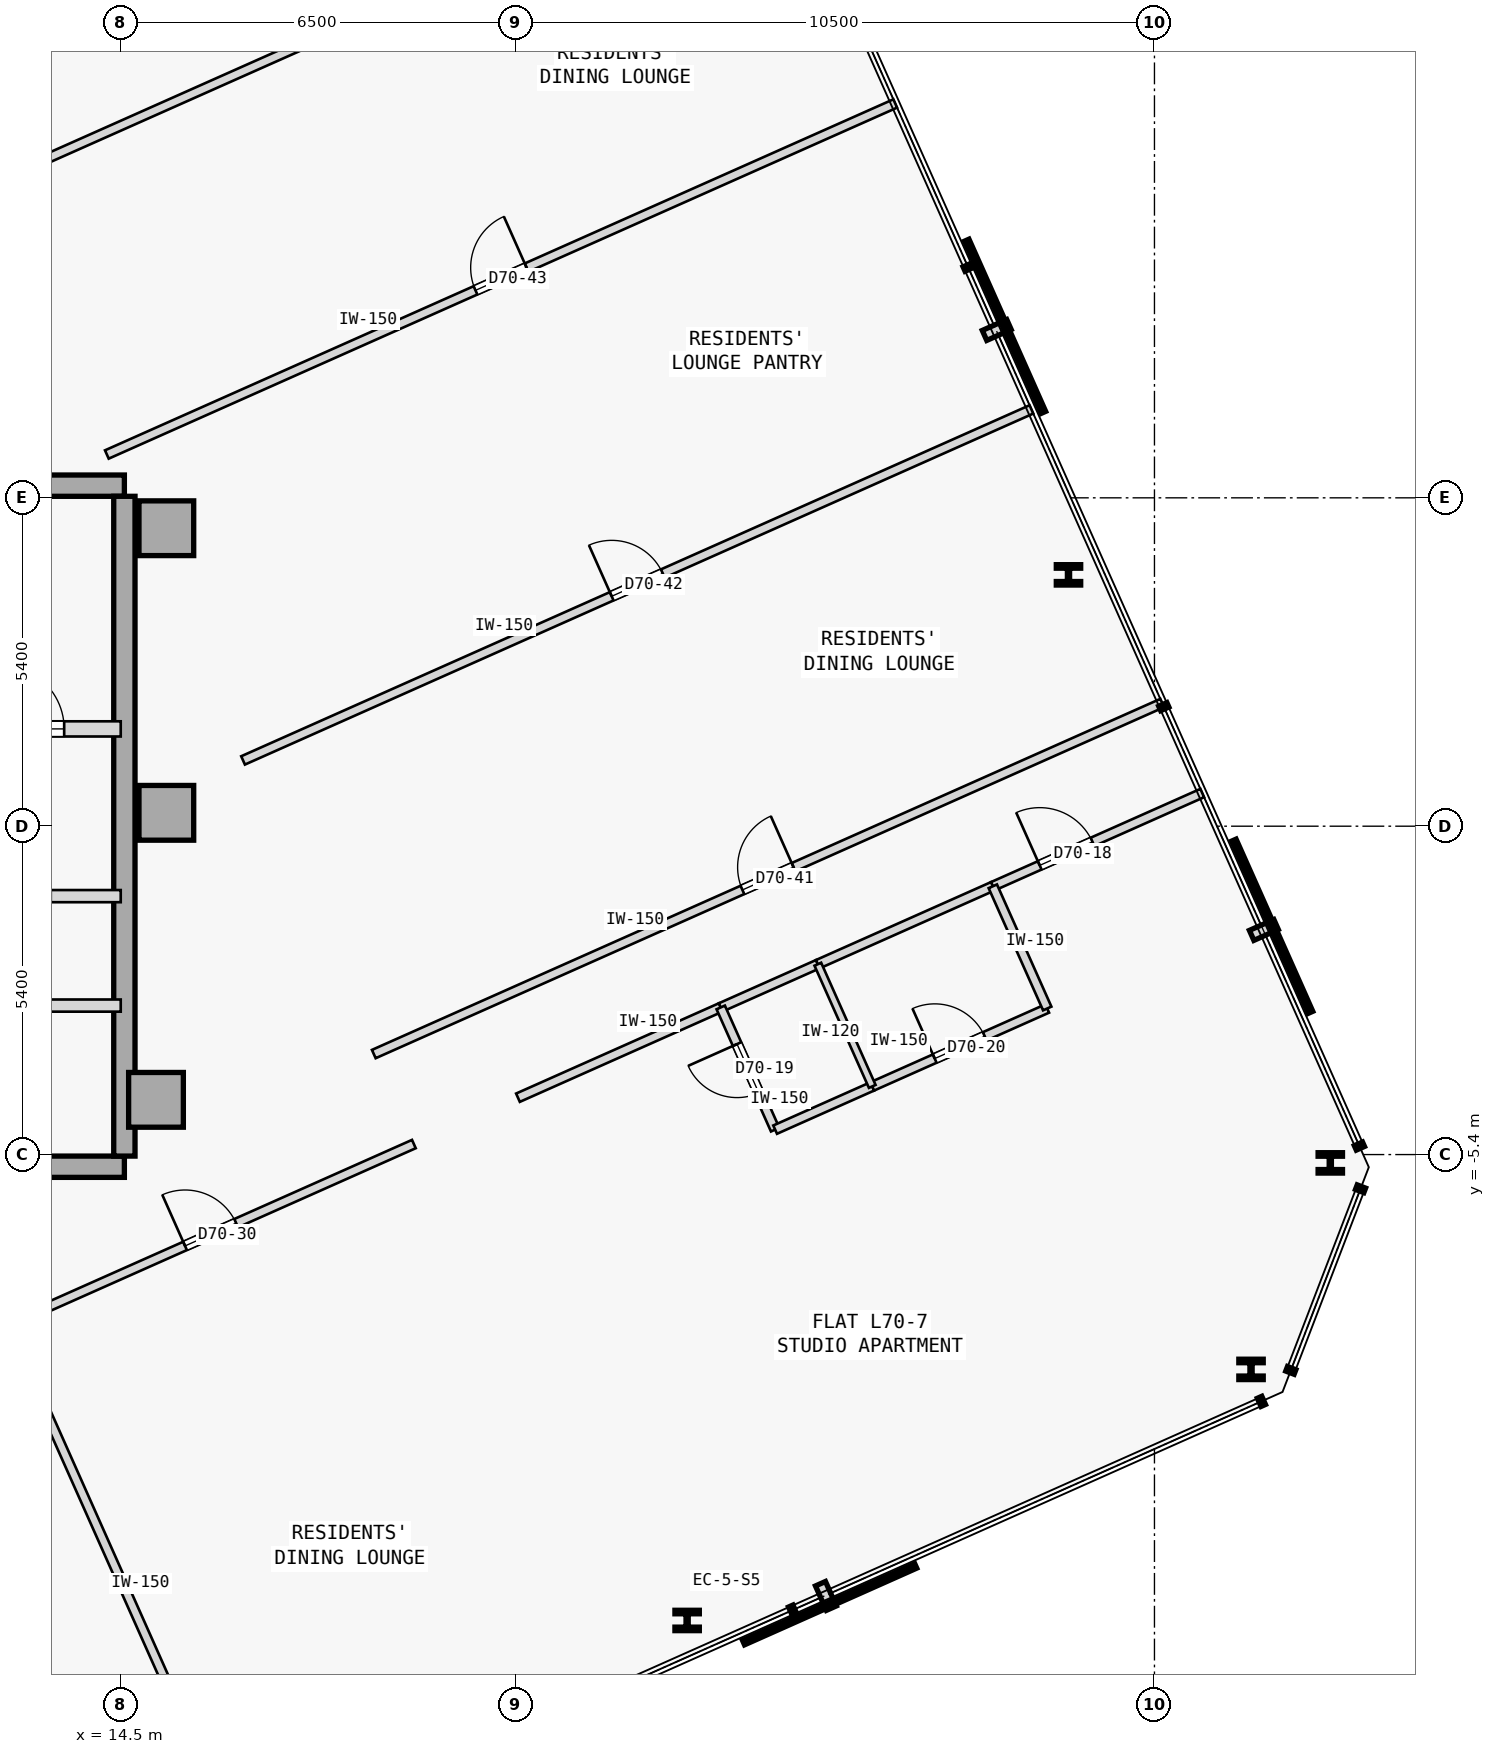
"""IFC4 building model, lengths in metres.
Left out: names, types, materials, properties, quantities, classifications, styles, units other than length and angle.
Written with IfcOpenShell. Run it as: python <this file> out.ifc"""

import sys

from ifc_helpers import new_model, si_unit, direction, frame, frame_2d, origin, origin_2d, place, context, subcontext, project, spatial, rectangle, i_section, extrude, element, fill, save


model = new_model("IFC4")
c1 = context("Model", 3, precision=1e-05, world=origin(), true_north=direction((0.0, 1.0)))
c2 = subcontext(c1, "Body", "Model", "MODEL_VIEW")
j1 = project(units=[si_unit("LENGTHUNIT", "METRE"), si_unit("PLANEANGLEUNIT", "RADIAN")], contexts=[c1])
p1 = place(None, origin())
s1 = spatial("IfcSite", under=j1, at=p1, CompositionType="ELEMENT")
p2 = place(p1, origin())
s2 = spatial("IfcBuilding", under=s1, at=p2, CompositionType="ELEMENT")
p3 = place(p2, frame((0.0, 0.0, 262.2)))
s3 = spatial("IfcBuildingStorey", under=s2, at=p3, CompositionType="ELEMENT", Elevation=262.2)
for number, where, z_axis, x_axis in (
    (1, (15.25, 4.9, 0.0), (0.0, 0.0, 1.0), (1.0, 0.0, 0.0)),
    (2, (15.25, 0.22, 0.0), (0.0, 0.0, 1.0), (1.0, 0.0, 0.0)),
    (3, (15.08, -4.5, 0.0), (0.0, 0.0, 1.0), (1.0, 0.0, 0.0)),
):
    element("IfcColumn", number, at=place(p3, frame(where, z_axis=z_axis, x_axis=x_axis)), inside=s3, PredefinedType="COLUMN", context=c2, shape_type="SweptSolid", body=[
        extrude(rectangle(XDim=0.9, YDim=0.9, at=origin_2d()), origin(), (0.0, 0.0, 1.0), 3.35),
    ])
p4 = place(p3, frame((3.15, 5.6, 0.0), z_axis=(0.0, 0.0, 1.0), x_axis=(1.0, 0.0, 0.0)))
e4 = element("IfcWall", 4, at=p4, inside=s3, PredefinedType="SHEAR", context=c2, shape_type="SweptSolid", body=[
    extrude(rectangle(XDim=11.41, YDim=0.35, at=frame_2d((5.705, 0.0))), origin(), (0.0, 0.0, 1.0), 3.125),
])
p5 = place(p3, frame((3.7, -5.6, 0.0), z_axis=(0.0, 0.0, 1.0), x_axis=(1.0, 0.0, 0.0)))
e5 = element("IfcWall", 5, at=p5, inside=s3, PredefinedType="SHEAR", context=c2, shape_type="SweptSolid", body=[
    extrude(rectangle(XDim=10.86, YDim=0.35, at=frame_2d((5.43, 0.0))), origin(), (0.0, 0.0, 1.0), 3.125),
])
p6 = place(p3, frame((14.56, -5.425, 0.0), z_axis=(0.0, 0.0, 1.0), x_axis=(0.0, 1.0, 0.0)))
e6 = element("IfcWall", 6, at=p6, inside=s3, PredefinedType="SHEAR", context=c2, shape_type="SweptSolid", body=[
    extrude(rectangle(XDim=10.85, YDim=0.35, at=frame_2d((5.425, 0.0))), origin(), (0.0, 0.0, 1.0), 3.125),
])
for number, where, z_axis, x_axis in (
    (7, (23.814, -13.062, 0.0), (0.0, 0.0, 1.0), (1.0, 0.0, 0.0)),
    (8, (33.088, -8.933, 0.0), (0.0, 0.0, 1.0), (1.0, 0.0, 0.0)),
    (9, (34.392, -5.537, 0.0), (0.0, 0.0, 1.0), (1.0, 0.0, 0.0)),
    (10, (30.086, 4.133, 0.0), (0.0, 0.0, 1.0), (1.0, 0.0, 0.0)),
):
    element("IfcColumn", number, at=place(p3, frame(where, z_axis=z_axis, x_axis=x_axis)), inside=s3, PredefinedType="COLUMN", context=c2, shape_type="SweptSolid", body=[
        extrude(i_section(OverallWidth=0.401, OverallDepth=0.335, WebThickness=0.036, FlangeThickness=0.058, FilletRadius=0.015, at=origin_2d()), origin(), (0.0, 0.0, 1.0), 3.35),
    ])
p7 = place(p3, frame((10.9, 1.6, 0.0), z_axis=(0.0, 0.0, 1.0), x_axis=(1.0, 0.0, 0.0)))
e11 = element("IfcWall", 11, at=p7, inside=s3, PredefinedType="STANDARD", context=c2, shape_type="SweptSolid", body=[
    extrude(rectangle(XDim=3.6, YDim=0.25, at=frame_2d((1.8, 0.0))), origin(), (0.0, 0.0, 1.0), 3.125),
])
p8 = place(p7, frame((1.62, 0.0, 0.0)))
e12 = element("IfcOpeningElement", 12, at=p8, cuts=e11, PredefinedType="OPENING", context=c2, shape_type="SweptSolid", body=[
    extrude(rectangle(XDim=1.05, YDim=2.15, at=frame_2d((0.525, 1.075))), frame((0.0, 0.135, 0.0), z_axis=(0.0, -1.0, 0.0), x_axis=(1.0, 0.0, 0.0)), (0.0, 0.0, 1.0), 0.27),
])
p9 = place(p3, frame((11.55, -1.15, 0.0), z_axis=(0.0, 0.0, 1.0), x_axis=(1.0, 0.0, 0.0)))
e13 = element("IfcWall", 13, at=p9, inside=s3, PredefinedType="STANDARD", context=c2, shape_type="SweptSolid", body=[
    extrude(rectangle(XDim=2.95, YDim=0.2, at=frame_2d((1.475, 0.0))), origin(), (0.0, 0.0, 1.0), 3.125),
])
p10 = place(p9, frame((0.75, 0.0, 0.0)))
e14 = element("IfcOpeningElement", 14, at=p10, cuts=e13, PredefinedType="OPENING", context=c2, shape_type="SweptSolid", body=[
    extrude(rectangle(XDim=1.05, YDim=2.18, at=frame_2d((0.525, 1.09))), frame((0.0, 0.11, 0.0), z_axis=(0.0, -1.0, 0.0), x_axis=(1.0, 0.0, 0.0)), (0.0, 0.0, 1.0), 0.22),
])
p11 = place(p3, frame((3.7, -2.95, 0.0), z_axis=(0.0, 0.0, 1.0), x_axis=(1.0, 0.0, 0.0)))
e15 = element("IfcWall", 15, at=p11, inside=s3, PredefinedType="STANDARD", context=c2, shape_type="SweptSolid", body=[
    extrude(rectangle(XDim=10.8, YDim=0.2, at=frame_2d((5.4, 0.0))), origin(), (0.0, 0.0, 1.0), 3.125),
])
p12 = place(p11, frame((0.53, 0.0, 0.0)))
e16 = element("IfcOpeningElement", 16, at=p12, cuts=e15, PredefinedType="OPENING", context=c2, shape_type="SweptSolid", body=[
    extrude(rectangle(XDim=1.1, YDim=2.15, at=frame_2d((0.55, 1.075))), frame((0.0, 0.11, 0.0), z_axis=(0.0, -1.0, 0.0), x_axis=(1.0, 0.0, 0.0)), (0.0, 0.0, 1.0), 0.22),
])
p13 = place(p11, frame((3.79, 0.0, 0.0)))
e17 = element("IfcOpeningElement", 17, at=p13, cuts=e15, PredefinedType="OPENING", context=c2, shape_type="SweptSolid", body=[
    extrude(rectangle(XDim=0.92, YDim=2.15, at=frame_2d((0.46, 1.075))), frame((0.0, 0.11, 0.0), z_axis=(0.0, -1.0, 0.0), x_axis=(1.0, 0.0, 0.0)), (0.0, 0.0, 1.0), 0.22),
])
p14 = place(p11, frame((8.11, 0.0, 0.0)))
e18 = element("IfcOpeningElement", 18, at=p14, cuts=e15, PredefinedType="OPENING", context=c2, shape_type="SweptSolid", body=[
    extrude(rectangle(XDim=0.92, YDim=2.15, at=frame_2d((0.46, 1.075))), frame((0.0, 0.11, 0.0), z_axis=(0.0, -1.0, 0.0), x_axis=(1.0, 0.0, 0.0)), (0.0, 0.0, 1.0), 0.22),
])
p15 = place(p3, frame((21.033, -4.465, 0.0), z_axis=(0.0, 0.0, 1.0), x_axis=(0.913543802, 0.40674036169, 0.0)))
e19 = element("IfcWall", 19, at=p15, inside=s3, PredefinedType="PARTITIONING", context=c2, shape_type="SweptSolid", body=[
    extrude(rectangle(XDim=3.65, YDim=0.15, at=frame_2d((1.825, 0.0))), origin(), (0.0, 0.0, 1.0), 3.125),
])
p16 = place(p3, frame((28.842, -0.988, 0.0), z_axis=(0.0, 0.0, 1.0), x_axis=(0.913541633228, 0.406745232743, 0.0)))
e20 = element("IfcWall", 20, at=p16, inside=s3, PredefinedType="PARTITIONING", context=c2, shape_type="SweptSolid", body=[
    extrude(rectangle(XDim=3.77, YDim=0.15, at=frame_2d((1.885, 0.0))), origin(), (0.0, 0.0, 1.0), 3.125),
])
p17 = place(p16, frame((0.844, 0.0, 0.0)))
e21 = element("IfcOpeningElement", 21, at=p17, cuts=e20, PredefinedType="OPENING", context=c2, shape_type="SweptSolid", body=[
    extrude(rectangle(XDim=0.95, YDim=2.15, at=frame_2d((0.475, 1.075))), frame((0.0, 0.085, 0.0), z_axis=(0.0, -1.0, 0.0), x_axis=(1.0, 0.0, 0.0)), (0.0, 0.0, 1.0), 0.17),
])
p18 = place(p3, frame((24.367, -2.98, 0.0), z_axis=(0.0, 0.0, 1.0), x_axis=(0.9135579554, 0.406708571492, 0.0)))
e22 = element("IfcWall", 22, at=p18, inside=s3, PredefinedType="PARTITIONING", context=c2, shape_type="SweptSolid", body=[
    extrude(rectangle(XDim=1.748, YDim=0.15, at=frame_2d((0.874, 0.0))), origin(), (0.0, 0.0, 1.0), 3.125),
])
p19 = place(p3, frame((25.964, -2.269, 0.0), z_axis=(0.0, 0.0, 1.0), x_axis=(0.913542880558, 0.406742431252, 0.0)))
e23 = element("IfcWall", 23, at=p19, inside=s3, PredefinedType="PARTITIONING", context=c2, shape_type="SweptSolid", body=[
    extrude(rectangle(XDim=3.15, YDim=0.15, at=frame_2d((1.575, 0.0))), origin(), (0.0, 0.0, 1.0), 3.125),
])
p20 = place(p3, frame((12.635, -8.204, 0.0), z_axis=(0.0, 0.0, 1.0), x_axis=(0.913541702649, 0.406745076825, 0.0)))
e24 = element("IfcWall", 24, at=p20, inside=s3, PredefinedType="PARTITIONING", context=c2, shape_type="SweptSolid", body=[
    extrude(rectangle(XDim=7.318, YDim=0.15, at=frame_2d((3.659, 0.0))), origin(), (0.0, 0.0, 1.0), 3.125),
])
p21 = place(p20, frame((3.199, 0.0, 0.0)))
e25 = element("IfcOpeningElement", 25, at=p21, cuts=e24, PredefinedType="OPENING", context=c2, shape_type="SweptSolid", body=[
    extrude(rectangle(XDim=0.92, YDim=2.15, at=frame_2d((0.46, 1.075))), frame((0.0, 0.085, 0.0), z_axis=(0.0, -1.0, 0.0), x_axis=(1.0, 0.0, 0.0)), (0.0, 0.0, 1.0), 0.17),
])
p22 = place(p3, frame((18.662, -3.747, 0.0), z_axis=(0.0, 0.0, 1.0), x_axis=(0.913544622417, 0.406738519018, 0.0)))
e26 = element("IfcWall", 26, at=p22, inside=s3, PredefinedType="PARTITIONING", context=c2, shape_type="SweptSolid", body=[
    extrude(rectangle(XDim=14.192, YDim=0.15, at=frame_2d((7.096, 0.0))), origin(), (0.0, 0.0, 1.0), 3.125),
])
p23 = place(p22, frame((6.636, 0.0, 0.0)))
e27 = element("IfcOpeningElement", 27, at=p23, cuts=e26, PredefinedType="OPENING", context=c2, shape_type="SweptSolid", body=[
    extrude(rectangle(XDim=0.92, YDim=2.15, at=frame_2d((0.46, 1.075))), frame((0.0, 0.085, 0.0), z_axis=(0.0, -1.0, 0.0), x_axis=(1.0, 0.0, 0.0)), (0.0, 0.0, 1.0), 0.17),
])
p24 = place(p3, frame((25.262, -4.99, 0.0), z_axis=(0.0, 0.0, 1.0), x_axis=(-0.406725294076, 0.913550510459, 0.0)))
e28 = element("IfcWall", 28, at=p24, inside=s3, PredefinedType="PARTITIONING", context=c2, shape_type="SweptSolid", body=[
    extrude(rectangle(XDim=2.2, YDim=0.15, at=frame_2d((1.1, 0.0))), origin(), (0.0, 0.0, 1.0), 3.125),
])
p25 = place(p24, frame((0.66, 0.0, 0.0)))
e29 = element("IfcOpeningElement", 29, at=p25, cuts=e28, PredefinedType="OPENING", context=c2, shape_type="SweptSolid", body=[
    extrude(rectangle(XDim=0.88, YDim=2.15, at=frame_2d((0.44, 1.075))), frame((0.0, 0.085, 0.0), z_axis=(0.0, -1.0, 0.0), x_axis=(1.0, 0.0, 0.0)), (0.0, 0.0, 1.0), 0.17),
])
p26 = place(p3, frame((25.262, -4.99, 0.0), z_axis=(0.0, 0.0, 1.0), x_axis=(0.9135579554, 0.406708571492, 0.0)))
e30 = element("IfcWall", 30, at=p26, inside=s3, PredefinedType="PARTITIONING", context=c2, shape_type="SweptSolid", body=[
    extrude(rectangle(XDim=1.748, YDim=0.15, at=frame_2d((0.874, 0.0))), origin(), (0.0, 0.0, 1.0), 3.125),
])
p27 = place(p3, frame((26.859, -4.279, 0.0), z_axis=(0.0, 0.0, 1.0), x_axis=(0.913542880558, 0.406742431252, 0.0)))
e31 = element("IfcWall", 31, at=p27, inside=s3, PredefinedType="PARTITIONING", context=c2, shape_type="SweptSolid", body=[
    extrude(rectangle(XDim=3.15, YDim=0.15, at=frame_2d((1.575, 0.0))), origin(), (0.0, 0.0, 1.0), 3.125),
])
p28 = place(p27, frame((1.125, 0.0, 0.0)))
e32 = element("IfcOpeningElement", 32, at=p28, cuts=e31, PredefinedType="OPENING", context=c2, shape_type="SweptSolid", body=[
    extrude(rectangle(XDim=0.9, YDim=2.15, at=frame_2d((0.45, 1.075))), frame((0.0, 0.085, 0.0), z_axis=(0.0, -1.0, 0.0), x_axis=(1.0, 0.0, 0.0)), (0.0, 0.0, 1.0), 0.17),
])
p29 = place(p3, frame((29.737, -2.998, 0.0), z_axis=(0.0, 0.0, 1.0), x_axis=(-0.406725294076, 0.913550510459, 0.0)))
e33 = element("IfcWall", 33, at=p29, inside=s3, PredefinedType="PARTITIONING", context=c2, shape_type="SweptSolid", body=[
    extrude(rectangle(XDim=2.2, YDim=0.15, at=frame_2d((1.1, 0.0))), origin(), (0.0, 0.0, 1.0), 3.125),
])
p30 = place(p3, frame((26.859, -4.279, 0.0), z_axis=(0.0, 0.0, 1.0), x_axis=(-0.406725294076, 0.913550510459, 0.0)))
e34 = element("IfcWall", 34, at=p30, inside=s3, PredefinedType="PARTITIONING", context=c2, shape_type="SweptSolid", body=[
    extrude(rectangle(XDim=2.2, YDim=0.12, at=frame_2d((1.1, 0.0))), origin(), (0.0, 0.0, 1.0), 3.125),
])
p31 = place(p3, frame((16.514, -16.914, 0.0), z_axis=(0.0, 0.0, 1.0), x_axis=(-0.406729927653, 0.913548447512, 0.0)))
e35 = element("IfcWall", 35, at=p31, inside=s3, PredefinedType="PARTITIONING", context=c2, shape_type="SweptSolid", body=[
    extrude(rectangle(XDim=9.535, YDim=0.15, at=frame_2d((4.768, 0.0))), origin(), (0.0, 0.0, 1.0), 3.125),
])
p32 = place(p3, frame((16.512, 1.082, 0.0), z_axis=(0.0, 0.0, 1.0), x_axis=(0.913544622417, 0.406738519018, 0.0)))
e36 = element("IfcWall", 36, at=p32, inside=s3, PredefinedType="PARTITIONING", context=c2, shape_type="SweptSolid", body=[
    extrude(rectangle(XDim=14.192, YDim=0.15, at=frame_2d((7.096, 0.0))), origin(), (0.0, 0.0, 1.0), 3.125),
])
p33 = place(p32, frame((6.636, 0.0, 0.0)))
e37 = element("IfcOpeningElement", 37, at=p33, cuts=e36, PredefinedType="OPENING", context=c2, shape_type="SweptSolid", body=[
    extrude(rectangle(XDim=0.92, YDim=2.15, at=frame_2d((0.46, 1.075))), frame((0.0, 0.085, 0.0), z_axis=(0.0, -1.0, 0.0), x_axis=(1.0, 0.0, 0.0)), (0.0, 0.0, 1.0), 0.17),
])
p34 = place(p3, frame((14.272, 6.113, 0.0), z_axis=(0.0, 0.0, 1.0), x_axis=(0.913551014388, 0.406724162191, 0.0)))
e38 = element("IfcWall", 38, at=p34, inside=s3, PredefinedType="PARTITIONING", context=c2, shape_type="SweptSolid", body=[
    extrude(rectangle(XDim=14.192, YDim=0.15, at=frame_2d((7.096, 0.0))), origin(), (0.0, 0.0, 1.0), 3.125),
])
p35 = place(p34, frame((6.636, 0.0, 0.0)))
e39 = element("IfcOpeningElement", 39, at=p35, cuts=e38, PredefinedType="OPENING", context=c2, shape_type="SweptSolid", body=[
    extrude(rectangle(XDim=0.92, YDim=2.15, at=frame_2d((0.46, 1.075))), frame((0.0, 0.085, 0.0), z_axis=(0.0, -1.0, 0.0), x_axis=(1.0, 0.0, 0.0)), (0.0, 0.0, 1.0), 0.17),
])
p36 = place(p3, frame((12.301, 10.54, 0.0), z_axis=(0.0, 0.0, 1.0), x_axis=(0.913544622417, 0.406738519018, 0.0)))
e40 = element("IfcWall", 40, at=p36, inside=s3, PredefinedType="PARTITIONING", context=c2, shape_type="SweptSolid", body=[
    extrude(rectangle(XDim=14.192, YDim=0.15, at=frame_2d((7.096, 0.0))), origin(), (0.0, 0.0, 1.0), 2.675),
])
p37 = place(p36, frame((6.636, 0.0, 0.0)))
e41 = element("IfcOpeningElement", 41, at=p37, cuts=e40, PredefinedType="OPENING", context=c2, shape_type="SweptSolid", body=[
    extrude(rectangle(XDim=0.92, YDim=2.15, at=frame_2d((0.46, 1.075))), frame((0.0, 0.085, 0.0), z_axis=(0.0, -1.0, 0.0), x_axis=(1.0, 0.0, 0.0)), (0.0, 0.0, 1.0), 0.17),
])
p38 = place(p8, origin())
e42 = element("IfcDoor", 42, at=p38, inside=s3, OperationType="SINGLE_SWING_LEFT", PredefinedType="DOOR", context=c2, shape_type="SweptSolid", body=[
    extrude(rectangle(XDim=1.05, YDim=2.15, at=frame_2d((0.525, 1.075))), frame((0.0, 0.025, 0.0), z_axis=(0.0, -1.0, 0.0), x_axis=(1.0, 0.0, 0.0)), (0.0, 0.0, 1.0), 0.05),
])
fill(e12, e42)
p39 = place(p17, origin())
e43 = element("IfcDoor", 43, at=p39, inside=s3, OperationType="SINGLE_SWING_LEFT", PredefinedType="DOOR", context=c2, shape_type="SweptSolid", body=[
    extrude(rectangle(XDim=0.95, YDim=2.15, at=frame_2d((0.475, 1.075))), frame((0.0, 0.025, 0.0), z_axis=(0.0, -1.0, 0.0), x_axis=(1.0, 0.0, 0.0)), (0.0, 0.0, 1.0), 0.05),
])
fill(e21, e43)
p40 = place(p25, origin())
e44 = element("IfcDoor", 44, at=p40, inside=s3, OperationType="SINGLE_SWING_RIGHT", PredefinedType="DOOR", context=c2, shape_type="SweptSolid", body=[
    extrude(rectangle(XDim=0.88, YDim=2.15, at=frame_2d((0.44, 1.075))), frame((0.0, 0.025, 0.0), z_axis=(0.0, -1.0, 0.0), x_axis=(1.0, 0.0, 0.0)), (0.0, 0.0, 1.0), 0.05),
])
fill(e29, e44)
p41 = place(p28, origin())
e45 = element("IfcDoor", 45, at=p41, inside=s3, OperationType="SINGLE_SWING_LEFT", PredefinedType="DOOR", context=c2, shape_type="SweptSolid", body=[
    extrude(rectangle(XDim=0.9, YDim=2.15, at=frame_2d((0.45, 1.075))), frame((0.0, 0.025, 0.0), z_axis=(0.0, -1.0, 0.0), x_axis=(1.0, 0.0, 0.0)), (0.0, 0.0, 1.0), 0.05),
])
fill(e32, e45)
p42 = place(p21, origin())
e46 = element("IfcDoor", 46, at=p42, inside=s3, OperationType="SINGLE_SWING_LEFT", PredefinedType="DOOR", context=c2, shape_type="SweptSolid", body=[
    extrude(rectangle(XDim=0.92, YDim=2.15, at=frame_2d((0.46, 1.075))), frame((0.0, 0.025, 0.0), z_axis=(0.0, -1.0, 0.0), x_axis=(1.0, 0.0, 0.0)), (0.0, 0.0, 1.0), 0.05),
])
fill(e25, e46)
p43 = place(p23, origin())
e47 = element("IfcDoor", 47, at=p43, inside=s3, OperationType="SINGLE_SWING_RIGHT", PredefinedType="DOOR", context=c2, shape_type="SweptSolid", body=[
    extrude(rectangle(XDim=0.92, YDim=2.15, at=frame_2d((0.46, 1.075))), frame((0.0, 0.025, 0.0), z_axis=(0.0, -1.0, 0.0), x_axis=(1.0, 0.0, 0.0)), (0.0, 0.0, 1.0), 0.05),
])
fill(e27, e47)
p44 = place(p33, origin())
e48 = element("IfcDoor", 48, at=p44, inside=s3, OperationType="SINGLE_SWING_LEFT", PredefinedType="DOOR", context=c2, shape_type="SweptSolid", body=[
    extrude(rectangle(XDim=0.92, YDim=2.15, at=frame_2d((0.46, 1.075))), frame((0.0, 0.025, 0.0), z_axis=(0.0, -1.0, 0.0), x_axis=(1.0, 0.0, 0.0)), (0.0, 0.0, 1.0), 0.05),
])
fill(e37, e48)
p45 = place(p35, origin())
e49 = element("IfcDoor", 49, at=p45, inside=s3, OperationType="SINGLE_SWING_RIGHT", PredefinedType="DOOR", context=c2, shape_type="SweptSolid", body=[
    extrude(rectangle(XDim=0.92, YDim=2.15, at=frame_2d((0.46, 1.075))), frame((0.0, 0.025, 0.0), z_axis=(0.0, -1.0, 0.0), x_axis=(1.0, 0.0, 0.0)), (0.0, 0.0, 1.0), 0.05),
])
fill(e39, e49)
save(model, sys.argv[1])
